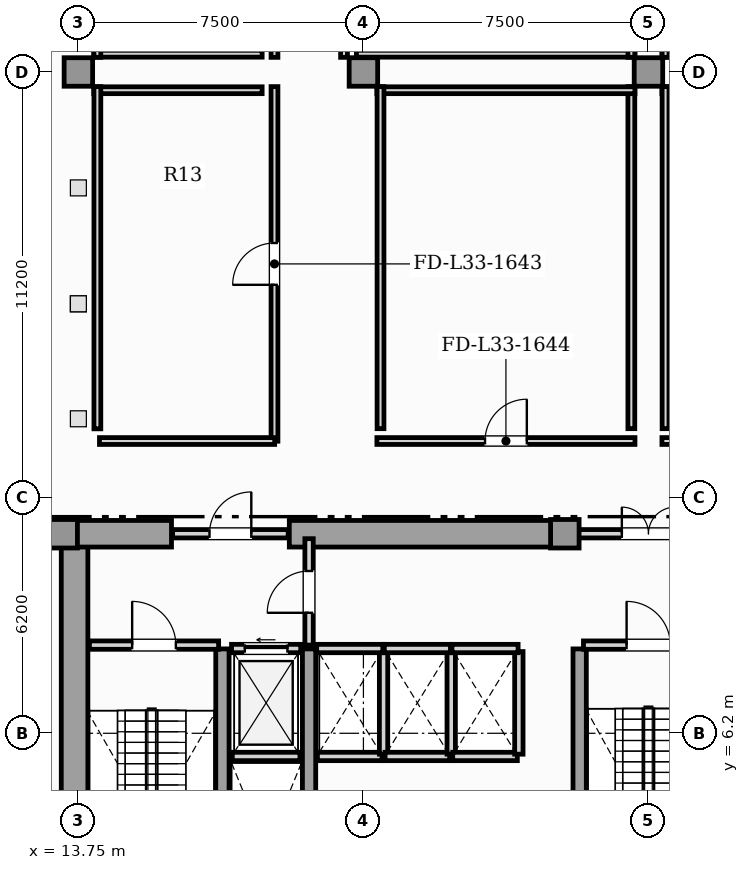
"""IFC4 building model, lengths in metres.
Left out: names, types, materials, properties, quantities, classifications, styles, units other than length and angle.
Written with IfcOpenShell. Run it as: python <this file> out.ifc"""

import sys

from ifc_helpers import new_model, si_unit, direction, frame, frame_2d, origin, origin_2d, place, context, subcontext, project, spatial, rectangle, extrude, element, fill, save


model = new_model("IFC4")
c1 = context("Model", 3, precision=1e-05, world=origin(), true_north=direction((0.0, 1.0)))
c2 = subcontext(c1, "Body", "Model", "MODEL_VIEW")
j1 = project(units=[si_unit("LENGTHUNIT", "METRE"), si_unit("PLANEANGLEUNIT", "RADIAN")], contexts=[c1])
p1 = place(None, origin())
s1 = spatial("IfcSite", under=j1, at=p1, CompositionType="ELEMENT")
p2 = place(p1, origin())
s2 = spatial("IfcBuilding", under=s1, at=p2, CompositionType="ELEMENT")
p3 = place(p2, frame((0.0, 0.0, 134.95)))
s3 = spatial("IfcBuildingStorey", under=s2, at=p3, CompositionType="ELEMENT", Elevation=134.95)
p4 = place(p3, frame((13.65, 0.92, 0.0), z_axis=(0.0, 0.0, 1.0), x_axis=(0.0, 1.0, 0.0)))
e1 = element("IfcWall", 1, at=p4, inside=s3, PredefinedType="SHEAR", context=c2, shape_type="SweptSolid", body=[
    extrude(rectangle(XDim=10.53, YDim=0.7, at=frame_2d((5.265, 0.0))), origin(), (0.0, 0.0, 1.0), 4.92),
])
p5 = place(p3, frame((13.25, 11.45, 0.0), z_axis=(0.0, 0.0, 1.0), x_axis=(1.0, 0.0, 0.0)))
e2 = element("IfcWall", 2, at=p5, inside=s3, PredefinedType="SHEAR", context=c2, shape_type="SweptSolid", body=[
    extrude(rectangle(XDim=2.95, YDim=0.7, at=frame_2d((1.475, 0.0))), origin(), (0.0, 0.0, 1.0), 4.92),
])
p6 = place(p3, frame((19.3, 11.45, 0.0), z_axis=(0.0, 0.0, 1.0), x_axis=(1.0, 0.0, 0.0)))
e3 = element("IfcWall", 3, at=p6, inside=s3, PredefinedType="SHEAR", context=c2, shape_type="SweptSolid", body=[
    extrude(rectangle(XDim=7.3, YDim=0.7, at=frame_2d((3.65, 0.0))), origin(), (0.0, 0.0, 1.0), 4.92),
])
for number, where, z_axis, x_axis in (
    (4, (17.54, 0.92, 0.0), (0.0, 0.0, 1.0), (0.0, 1.0, 0.0)),
    (5, (19.82, 0.92, 0.0), (0.0, 0.0, 1.0), (0.0, 1.0, 0.0)),
    (6, (26.94, 0.92, 0.0), (0.0, 0.0, 1.0), (0.0, 1.0, 0.0)),
):
    element("IfcWall", number, at=place(p3, frame(where, z_axis=z_axis, x_axis=x_axis)), inside=s3, PredefinedType="SHEAR", context=c2, shape_type="SweptSolid", body=[
        extrude(rectangle(XDim=7.5, YDim=0.35, at=frame_2d((3.75, 0.0))), origin(), (0.0, 0.0, 1.0), 4.92),
    ])
for number, where, z_axis, x_axis in (
    (7, (13.35, 11.45, 0.0), (0.0, 0.0, 1.0), (1.0, 0.0, 0.0)),
    (8, (26.55, 11.45, 0.0), (0.0, 0.0, 1.0), (1.0, 0.0, 0.0)),
    (9, (13.75, 23.6, 0.0), (0.0, 0.0, 1.0), (1.0, 0.0, 0.0)),
    (10, (21.25, 23.6, 0.0), (0.0, 0.0, 1.0), (1.0, 0.0, 0.0)),
    (11, (28.75, 23.6, 0.0), (0.0, 0.0, 1.0), (1.0, 0.0, 0.0)),
):
    element("IfcColumn", number, at=place(p3, frame(where, z_axis=z_axis, x_axis=x_axis)), inside=s3, PredefinedType="COLUMN", context=c2, shape_type="SweptSolid", body=[
        extrude(rectangle(XDim=0.75, YDim=0.75, at=origin_2d()), origin(), (0.0, 0.0, 1.0), 5.2),
    ])
p7 = place(p3, frame((17.8, 5.59, 0.0), z_axis=(0.0, 0.0, 1.0), x_axis=(1.0, 0.0, 0.0)))
e12 = element("IfcWall", 12, at=p7, inside=s3, PredefinedType="SOLIDWALL", context=c2, shape_type="SweptSolid", body=[
    extrude(rectangle(XDim=1.78, YDim=0.22, at=frame_2d((0.89, 0.0))), origin(), (0.0, 0.0, 1.0), 4.92),
])
p8 = place(p3, frame((17.78, 8.43, 0.0), z_axis=(0.0, 0.0, 1.0), x_axis=(1.0, 0.0, 0.0)))
e13 = element("IfcWall", 13, at=p8, inside=s3, PredefinedType="SOLIDWALL", context=c2, shape_type="SweptSolid", body=[
    extrude(rectangle(XDim=1.82, YDim=0.22, at=frame_2d((0.91, 0.0))), origin(), (0.0, 0.0, 1.0), 4.92),
])
p9 = place(p8, frame((0.35, 0.0, 0.0)))
e14 = element("IfcOpeningElement", 14, at=p9, cuts=e13, PredefinedType="OPENING", context=c2, shape_type="SweptSolid", body=[
    extrude(rectangle(XDim=1.12, YDim=2.25, at=frame_2d((0.56, 1.125))), frame((0.0, 0.12, 0.0), z_axis=(0.0, -1.0, 0.0), x_axis=(1.0, 0.0, 0.0)), (0.0, 0.0, 1.0), 0.24),
])
p10 = place(p3, frame((20.04, 5.59, 0.0), z_axis=(0.0, 0.0, 1.0), x_axis=(1.0, 0.0, 0.0)))
e15 = element("IfcWall", 15, at=p10, inside=s3, PredefinedType="SOLIDWALL", context=c2, shape_type="SweptSolid", body=[
    extrude(rectangle(XDim=1.7, YDim=0.22, at=frame_2d((0.85, 0.0))), origin(), (0.0, 0.0, 1.0), 4.92),
])
p11 = place(p3, frame((21.78, 5.65, 0.0), z_axis=(0.0, 0.0, 1.0), x_axis=(0.0, 1.0, 0.0)))
e16 = element("IfcWall", 16, at=p11, inside=s3, PredefinedType="SOLIDWALL", context=c2, shape_type="SweptSolid", body=[
    extrude(rectangle(XDim=2.7, YDim=0.22, at=frame_2d((1.35, 0.0))), origin(), (0.0, 0.0, 1.0), 4.92),
])
p12 = place(p3, frame((20.02, 8.43, 0.0), z_axis=(0.0, 0.0, 1.0), x_axis=(1.0, 0.0, 0.0)))
e17 = element("IfcWall", 17, at=p12, inside=s3, PredefinedType="SOLIDWALL", context=c2, shape_type="SweptSolid", body=[
    extrude(rectangle(XDim=1.74, YDim=0.22, at=frame_2d((0.87, 0.0))), origin(), (0.0, 0.0, 1.0), 4.92),
])
p13 = place(p3, frame((21.82, 5.59, 0.0), z_axis=(0.0, 0.0, 1.0), x_axis=(1.0, 0.0, 0.0)))
e18 = element("IfcWall", 18, at=p13, inside=s3, PredefinedType="SOLIDWALL", context=c2, shape_type="SweptSolid", body=[
    extrude(rectangle(XDim=1.7, YDim=0.22, at=frame_2d((0.85, 0.0))), origin(), (0.0, 0.0, 1.0), 4.92),
])
p14 = place(p3, frame((23.56, 5.65, 0.0), z_axis=(0.0, 0.0, 1.0), x_axis=(0.0, 1.0, 0.0)))
e19 = element("IfcWall", 19, at=p14, inside=s3, PredefinedType="SOLIDWALL", context=c2, shape_type="SweptSolid", body=[
    extrude(rectangle(XDim=2.7, YDim=0.22, at=frame_2d((1.35, 0.0))), origin(), (0.0, 0.0, 1.0), 4.92),
])
p15 = place(p3, frame((21.8, 8.43, 0.0), z_axis=(0.0, 0.0, 1.0), x_axis=(1.0, 0.0, 0.0)))
e20 = element("IfcWall", 20, at=p15, inside=s3, PredefinedType="SOLIDWALL", context=c2, shape_type="SweptSolid", body=[
    extrude(rectangle(XDim=1.74, YDim=0.22, at=frame_2d((0.87, 0.0))), origin(), (0.0, 0.0, 1.0), 4.92),
])
p16 = place(p3, frame((23.6, 5.59, 0.0), z_axis=(0.0, 0.0, 1.0), x_axis=(1.0, 0.0, 0.0)))
e21 = element("IfcWall", 21, at=p16, inside=s3, PredefinedType="SOLIDWALL", context=c2, shape_type="SweptSolid", body=[
    extrude(rectangle(XDim=1.7, YDim=0.22, at=frame_2d((0.85, 0.0))), origin(), (0.0, 0.0, 1.0), 4.92),
])
p17 = place(p3, frame((25.34, 5.65, 0.0), z_axis=(0.0, 0.0, 1.0), x_axis=(0.0, 1.0, 0.0)))
e22 = element("IfcWall", 22, at=p17, inside=s3, PredefinedType="SOLIDWALL", context=c2, shape_type="SweptSolid", body=[
    extrude(rectangle(XDim=2.7, YDim=0.22, at=frame_2d((1.35, 0.0))), origin(), (0.0, 0.0, 1.0), 4.92),
])
p18 = place(p3, frame((23.58, 8.43, 0.0), z_axis=(0.0, 0.0, 1.0), x_axis=(1.0, 0.0, 0.0)))
e23 = element("IfcWall", 23, at=p18, inside=s3, PredefinedType="SOLIDWALL", context=c2, shape_type="SweptSolid", body=[
    extrude(rectangle(XDim=1.74, YDim=0.22, at=frame_2d((0.87, 0.0))), origin(), (0.0, 0.0, 1.0), 4.92),
])
p19 = place(p3, frame((14.04, 8.52, 0.0), z_axis=(0.0, 0.0, 1.0), x_axis=(1.0, 0.0, 0.0)))
e24 = element("IfcWall", 24, at=p19, inside=s3, PredefinedType="SOLIDWALL", context=c2, shape_type="SweptSolid", body=[
    extrude(rectangle(XDim=3.4, YDim=0.22, at=frame_2d((1.7, 0.0))), origin(), (0.0, 0.0, 1.0), 4.92),
])
p20 = place(p19, frame((1.125, 0.0, 0.0)))
e25 = element("IfcOpeningElement", 25, at=p20, cuts=e24, PredefinedType="OPENING", context=c2, shape_type="SweptSolid", body=[
    extrude(rectangle(XDim=1.15, YDim=2.2, at=frame_2d((0.575, 1.1))), frame((0.0, 0.12, 0.0), z_axis=(0.0, -1.0, 0.0), x_axis=(1.0, 0.0, 0.0)), (0.0, 0.0, 1.0), 0.24),
])
p21 = place(p3, frame((27.04, 8.52, 0.0), z_axis=(0.0, 0.0, 1.0), x_axis=(1.0, 0.0, 0.0)))
e26 = element("IfcWall", 26, at=p21, inside=s3, PredefinedType="SOLIDWALL", context=c2, shape_type="SweptSolid", body=[
    extrude(rectangle(XDim=3.42, YDim=0.22, at=frame_2d((1.71, 0.0))), origin(), (0.0, 0.0, 1.0), 4.92),
])
p22 = place(p21, frame((1.135, 0.0, 0.0)))
e27 = element("IfcOpeningElement", 27, at=p22, cuts=e26, PredefinedType="OPENING", context=c2, shape_type="SweptSolid", body=[
    extrude(rectangle(XDim=1.15, YDim=2.2, at=frame_2d((0.575, 1.1))), frame((0.0, 0.12, 0.0), z_axis=(0.0, -1.0, 0.0), x_axis=(1.0, 0.0, 0.0)), (0.0, 0.0, 1.0), 0.24),
])
p23 = place(p3, frame((19.82, 8.52, 0.0), z_axis=(0.0, 0.0, 1.0), x_axis=(0.0, 1.0, 0.0)))
e28 = element("IfcWall", 28, at=p23, inside=s3, PredefinedType="SOLIDWALL", context=c2, shape_type="SweptSolid", body=[
    extrude(rectangle(XDim=2.8, YDim=0.22, at=frame_2d((1.4, 0.0))), origin(), (0.0, 0.0, 1.0), 4.375),
])
p24 = place(p23, frame((0.85, 0.0, 0.0)))
e29 = element("IfcOpeningElement", 29, at=p24, cuts=e28, PredefinedType="OPENING", context=c2, shape_type="SweptSolid", body=[
    extrude(rectangle(XDim=1.1, YDim=2.2, at=frame_2d((0.55, 1.1))), frame((0.0, 0.12, 0.0), z_axis=(0.0, -1.0, 0.0), x_axis=(1.0, 0.0, 0.0)), (0.0, 0.0, 1.0), 0.24),
])
p25 = place(p3, frame((16.23, 11.45, 0.0), z_axis=(0.0, 0.0, 1.0), x_axis=(1.0, 0.0, 0.0)))
e30 = element("IfcWall", 30, at=p25, inside=s3, PredefinedType="SOLIDWALL", context=c2, shape_type="SweptSolid", body=[
    extrude(rectangle(XDim=3.04, YDim=0.22, at=frame_2d((1.52, 0.0))), origin(), (0.0, 0.0, 1.0), 4.92),
])
p26 = place(p25, frame((0.97, 0.0, 0.0)))
e31 = element("IfcOpeningElement", 31, at=p26, cuts=e30, PredefinedType="OPENING", context=c2, shape_type="SweptSolid", body=[
    extrude(rectangle(XDim=1.1, YDim=2.2, at=frame_2d((0.55, 1.1))), frame((0.0, 0.12, 0.0), z_axis=(0.0, -1.0, 0.0), x_axis=(1.0, 0.0, 0.0)), (0.0, 0.0, 1.0), 0.24),
])
p27 = place(p3, frame((26.63, 11.45, 0.0), z_axis=(0.0, 0.0, 1.0), x_axis=(1.0, 0.0, 0.0)))
e32 = element("IfcWall", 32, at=p27, inside=s3, PredefinedType="SOLIDWALL", context=c2, shape_type="SweptSolid", body=[
    extrude(rectangle(XDim=4.24, YDim=0.22, at=frame_2d((2.12, 0.0))), origin(), (0.0, 0.0, 1.0), 4.92),
])
p28 = place(p27, frame((1.42, 0.0, 0.0)))
e33 = element("IfcOpeningElement", 33, at=p28, cuts=e32, PredefinedType="OPENING", context=c2, shape_type="SweptSolid", body=[
    extrude(rectangle(XDim=1.4, YDim=2.2, at=frame_2d((0.7, 1.1))), frame((0.0, 0.12, 0.0), z_axis=(0.0, -1.0, 0.0), x_axis=(1.0, 0.0, 0.0)), (0.0, 0.0, 1.0), 0.24),
])
p29 = place(p3, frame((18.91, 13.885, 0.0), z_axis=(0.0, 0.0, 1.0), x_axis=(0.0, 1.0, 0.0)))
e34 = element("IfcWall", 34, at=p29, inside=s3, PredefinedType="PARTITIONING", context=c2, shape_type="SweptSolid", body=[
    extrude(rectangle(XDim=9.33, YDim=0.18, at=frame_2d((4.665, 0.0))), origin(), (0.0, 0.0, 1.0), 4.92),
])
p30 = place(p29, frame((4.115, 0.0, 0.0)))
e35 = element("IfcOpeningElement", 35, at=p30, cuts=e34, PredefinedType="OPENING", context=c2, shape_type="SweptSolid", body=[
    extrude(rectangle(XDim=1.1, YDim=2.2, at=frame_2d((0.55, 1.1))), frame((0.0, 0.1, 0.0), z_axis=(0.0, -1.0, 0.0), x_axis=(1.0, 0.0, 0.0)), (0.0, 0.0, 1.0), 0.2),
])
p31 = place(p3, frame((14.305, 13.89, 0.0), z_axis=(0.0, 0.0, 1.0), x_axis=(1.0, 0.0, 0.0)))
e36 = element("IfcWall", 36, at=p31, inside=s3, PredefinedType="PARTITIONING", context=c2, shape_type="SweptSolid", body=[
    extrude(rectangle(XDim=4.61, YDim=0.18, at=frame_2d((2.305, 0.0))), origin(), (0.0, 0.0, 1.0), 4.92),
])
p32 = place(p3, frame((21.605, 13.89, 0.0), z_axis=(0.0, 0.0, 1.0), x_axis=(1.0, 0.0, 0.0)))
e37 = element("IfcWall", 37, at=p32, inside=s3, PredefinedType="PARTITIONING", context=c2, shape_type="SweptSolid", body=[
    extrude(rectangle(XDim=6.79, YDim=0.18, at=frame_2d((3.395, 0.0))), origin(), (0.0, 0.0, 1.0), 4.92),
])
p33 = place(p32, frame((2.845, 0.0, 0.0)))
e38 = element("IfcOpeningElement", 38, at=p33, cuts=e37, PredefinedType="OPENING", context=c2, shape_type="SweptSolid", body=[
    extrude(rectangle(XDim=1.1, YDim=2.2, at=frame_2d((0.55, 1.1))), frame((0.0, 0.1, 0.0), z_axis=(0.0, -1.0, 0.0), x_axis=(1.0, 0.0, 0.0)), (0.0, 0.0, 1.0), 0.2),
])
p34 = place(p3, frame((29.105, 13.89, 0.0), z_axis=(0.0, 0.0, 1.0), x_axis=(1.0, 0.0, 0.0)))
e39 = element("IfcWall", 39, at=p34, inside=s3, PredefinedType="PARTITIONING", context=c2, shape_type="SweptSolid", body=[
    extrude(rectangle(XDim=7.66, YDim=0.18, at=frame_2d((3.83, 0.0))), origin(), (0.0, 0.0, 1.0), 4.92),
])
p35 = place(p3, frame((20.74, 23.985, 0.0), z_axis=(0.0, 0.0, 1.0), x_axis=(0.0, 1.0, 0.0)))
e40 = element("IfcWall", 40, at=p35, inside=s3, PredefinedType="PARTITIONING", context=c2, shape_type="SweptSolid", body=[
    extrude(rectangle(XDim=4.13, YDim=0.18, at=frame_2d((2.065, 0.0))), origin(), (0.0, 0.0, 1.0), 4.92),
])
p36 = place(p35, frame((1.515, 0.0, 0.0)))
e41 = element("IfcOpeningElement", 41, at=p36, cuts=e40, PredefinedType="OPENING", context=c2, shape_type="SweptSolid", body=[
    extrude(rectangle(XDim=1.1, YDim=2.2, at=frame_2d((0.55, 1.1))), frame((0.0, 0.1, 0.0), z_axis=(0.0, -1.0, 0.0), x_axis=(1.0, 0.0, 0.0)), (0.0, 0.0, 1.0), 0.2),
])
p37 = place(p3, frame((18.91, 23.985, 0.0), z_axis=(0.0, 0.0, 1.0), x_axis=(0.0, 1.0, 0.0)))
e42 = element("IfcWall", 42, at=p37, inside=s3, PredefinedType="PARTITIONING", context=c2, shape_type="SweptSolid", body=[
    extrude(rectangle(XDim=2.13, YDim=0.18, at=frame_2d((1.065, 0.0))), origin(), (0.0, 0.0, 1.0), 4.92),
])
p38 = place(p37, frame((0.515, 0.0, 0.0)))
e43 = element("IfcOpeningElement", 43, at=p38, cuts=e42, PredefinedType="OPENING", context=c2, shape_type="SweptSolid", body=[
    extrude(rectangle(XDim=1.1, YDim=2.2, at=frame_2d((0.55, 1.1))), frame((0.0, 0.1, 0.0), z_axis=(0.0, -1.0, 0.0), x_axis=(1.0, 0.0, 0.0)), (0.0, 0.0, 1.0), 0.2),
])
p39 = place(p3, frame((18.585, 23.12, 0.0), z_axis=(0.0, 0.0, 1.0), x_axis=(-1.0, 0.0, 0.0)))
e44 = element("IfcWall", 44, at=p39, inside=s3, PredefinedType="PARTITIONING", context=c2, shape_type="SweptSolid", body=[
    extrude(rectangle(XDim=4.43, YDim=0.18, at=frame_2d((2.215, 0.0))), origin(), (0.0, 0.0, 1.0), 4.92),
])
p40 = place(p3, frame((14.25, 23.215, 0.0), z_axis=(0.0, 0.0, 1.0), x_axis=(0.0, -1.0, 0.0)))
e45 = element("IfcWall", 45, at=p40, inside=s3, PredefinedType="PARTITIONING", context=c2, shape_type="SweptSolid", body=[
    extrude(rectangle(XDim=9.004, YDim=0.18, at=frame_2d((4.502, 0.0))), origin(), (0.0, 0.0, 1.0), 4.92),
])
p41 = place(p3, frame((28.3, 14.215, 0.0), z_axis=(0.0, 0.0, 1.0), x_axis=(0.0, 1.0, 0.0)))
e46 = element("IfcWall", 46, at=p41, inside=s3, PredefinedType="PARTITIONING", context=c2, shape_type="SweptSolid", body=[
    extrude(rectangle(XDim=9.0, YDim=0.18, at=frame_2d((4.5, 0.0))), origin(), (0.0, 0.0, 1.0), 4.92),
])
p42 = place(p3, frame((28.395, 23.12, 0.0), z_axis=(0.0, 0.0, 1.0), x_axis=(-1.0, 0.0, 0.0)))
e47 = element("IfcWall", 47, at=p42, inside=s3, PredefinedType="PARTITIONING", context=c2, shape_type="SweptSolid", body=[
    extrude(rectangle(XDim=6.79, YDim=0.18, at=frame_2d((3.395, 0.0))), origin(), (0.0, 0.0, 1.0), 4.92),
])
p43 = place(p3, frame((21.7, 23.215, 0.0), z_axis=(0.0, 0.0, 1.0), x_axis=(0.0, -1.0, 0.0)))
e48 = element("IfcWall", 48, at=p43, inside=s3, PredefinedType="PARTITIONING", context=c2, shape_type="SweptSolid", body=[
    extrude(rectangle(XDim=9.0, YDim=0.18, at=frame_2d((4.5, 0.0))), origin(), (0.0, 0.0, 1.0), 4.92),
])
p44 = place(p3, frame((36.435, 23.12, 0.0), z_axis=(0.0, 0.0, 1.0), x_axis=(-1.0, 0.0, 0.0)))
e49 = element("IfcWall", 49, at=p44, inside=s3, PredefinedType="PARTITIONING", context=c2, shape_type="SweptSolid", body=[
    extrude(rectangle(XDim=7.33, YDim=0.18, at=frame_2d((3.665, 0.0))), origin(), (0.0, 0.0, 1.0), 4.92),
])
p45 = place(p3, frame((29.2, 23.215, 0.0), z_axis=(0.0, 0.0, 1.0), x_axis=(0.0, -1.0, 0.0)))
e50 = element("IfcWall", 50, at=p45, inside=s3, PredefinedType="PARTITIONING", context=c2, shape_type="SweptSolid", body=[
    extrude(rectangle(XDim=9.0, YDim=0.18, at=frame_2d((4.5, 0.0))), origin(), (0.0, 0.0, 1.0), 4.92),
])
p46 = place(p3, frame((21.065, 24.08, 0.0), z_axis=(0.0, 0.0, 1.0), x_axis=(1.0, 0.0, 0.0)))
e51 = element("IfcWall", 51, at=p46, inside=s3, PredefinedType="PARTITIONING", context=c2, shape_type="SweptSolid", body=[
    extrude(rectangle(XDim=7.33, YDim=0.18, at=frame_2d((3.665, 0.0))), origin(), (0.0, 0.0, 1.0), 4.92),
])
p47 = place(p3, frame((28.3, 23.985, 0.0), z_axis=(0.0, 0.0, 1.0), x_axis=(0.0, 1.0, 0.0)))
e52 = element("IfcWall", 52, at=p47, inside=s3, PredefinedType="PARTITIONING", context=c2, shape_type="SweptSolid", body=[
    extrude(rectangle(XDim=4.13, YDim=0.18, at=frame_2d((2.065, 0.0))), origin(), (0.0, 0.0, 1.0), 4.92),
])
p48 = place(p3, frame((29.105, 24.08, 0.0), z_axis=(0.0, 0.0, 1.0), x_axis=(1.0, 0.0, 0.0)))
e53 = element("IfcWall", 53, at=p48, inside=s3, PredefinedType="PARTITIONING", context=c2, shape_type="SweptSolid", body=[
    extrude(rectangle(XDim=7.33, YDim=0.18, at=frame_2d((3.665, 0.0))), origin(), (0.0, 0.0, 1.0), 4.92),
])
p49 = place(p3, frame((29.2, 28.115, 0.0), z_axis=(0.0, 0.0, 1.0), x_axis=(0.0, -1.0, 0.0)))
e54 = element("IfcWall", 54, at=p49, inside=s3, PredefinedType="PARTITIONING", context=c2, shape_type="SweptSolid", body=[
    extrude(rectangle(XDim=4.13, YDim=0.18, at=frame_2d((2.065, 0.0))), origin(), (0.0, 0.0, 1.0), 4.92),
])
p50 = place(p3, frame((14.155, 24.08, 0.0), z_axis=(0.0, 0.0, 1.0), x_axis=(1.0, 0.0, 0.0)))
e55 = element("IfcWall", 55, at=p50, inside=s3, PredefinedType="PARTITIONING", context=c2, shape_type="SweptSolid", body=[
    extrude(rectangle(XDim=4.43, YDim=0.18, at=frame_2d((2.215, 0.0))), origin(), (0.0, 0.0, 1.0), 4.92),
])
p51 = place(p3, frame((14.25, 25.789, 0.0), z_axis=(0.0, 0.0, 1.0), x_axis=(0.0, -1.0, 0.0)))
e56 = element("IfcWall", 56, at=p51, inside=s3, PredefinedType="PARTITIONING", context=c2, shape_type="SweptSolid", body=[
    extrude(rectangle(XDim=1.804, YDim=0.18, at=frame_2d((0.902, 0.0))), origin(), (0.0, 0.0, 1.0), 4.92),
])
p52 = place(p9, origin())
e57 = element("IfcDoor", 57, at=p52, inside=s3, OperationType="SLIDING_TO_LEFT", PredefinedType="DOOR", context=c2, shape_type="SweptSolid", body=[
    extrude(rectangle(XDim=1.12, YDim=2.25, at=frame_2d((0.56, 1.125))), frame((0.0, 0.025, 0.0), z_axis=(0.0, -1.0, 0.0), x_axis=(1.0, 0.0, 0.0)), (0.0, 0.0, 1.0), 0.05),
])
fill(e14, e57)
p53 = place(p20, origin())
e58 = element("IfcDoor", 58, at=p53, inside=s3, OperationType="SINGLE_SWING_LEFT", PredefinedType="DOOR", context=c2, shape_type="SweptSolid", body=[
    extrude(rectangle(XDim=1.15, YDim=2.2, at=frame_2d((0.575, 1.1))), frame((0.0, 0.025, 0.0), z_axis=(0.0, -1.0, 0.0), x_axis=(1.0, 0.0, 0.0)), (0.0, 0.0, 1.0), 0.05),
])
fill(e25, e58)
p54 = place(p22, origin())
e59 = element("IfcDoor", 59, at=p54, inside=s3, OperationType="SINGLE_SWING_LEFT", PredefinedType="DOOR", context=c2, shape_type="SweptSolid", body=[
    extrude(rectangle(XDim=1.15, YDim=2.2, at=frame_2d((0.575, 1.1))), frame((0.0, 0.025, 0.0), z_axis=(0.0, -1.0, 0.0), x_axis=(1.0, 0.0, 0.0)), (0.0, 0.0, 1.0), 0.05),
])
fill(e27, e59)
p55 = place(p24, origin())
e60 = element("IfcDoor", 60, at=p55, inside=s3, OperationType="SINGLE_SWING_LEFT", PredefinedType="DOOR", context=c2, shape_type="SweptSolid", body=[
    extrude(rectangle(XDim=1.1, YDim=2.2, at=frame_2d((0.55, 1.1))), frame((0.0, 0.025, 0.0), z_axis=(0.0, -1.0, 0.0), x_axis=(1.0, 0.0, 0.0)), (0.0, 0.0, 1.0), 0.05),
])
fill(e29, e60)
p56 = place(p26, origin())
e61 = element("IfcDoor", 61, at=p56, inside=s3, OperationType="SINGLE_SWING_RIGHT", PredefinedType="DOOR", context=c2, shape_type="SweptSolid", body=[
    extrude(rectangle(XDim=1.1, YDim=2.2, at=frame_2d((0.55, 1.1))), frame((0.0, 0.025, 0.0), z_axis=(0.0, -1.0, 0.0), x_axis=(1.0, 0.0, 0.0)), (0.0, 0.0, 1.0), 0.05),
])
fill(e31, e61)
p57 = place(p28, origin())
e62 = element("IfcDoor", 62, at=p57, inside=s3, OperationType="DOUBLE_DOOR_SINGLE_SWING", PredefinedType="DOOR", context=c2, shape_type="SweptSolid", body=[
    extrude(rectangle(XDim=1.4, YDim=2.2, at=frame_2d((0.7, 1.1))), frame((0.0, 0.025, 0.0), z_axis=(0.0, -1.0, 0.0), x_axis=(1.0, 0.0, 0.0)), (0.0, 0.0, 1.0), 0.05),
])
fill(e33, e62)
p58 = place(p30, origin())
e63 = element("IfcDoor", 63, at=p58, inside=s3, OperationType="SINGLE_SWING_LEFT", PredefinedType="DOOR", context=c2, shape_type="SweptSolid", body=[
    extrude(rectangle(XDim=1.1, YDim=2.2, at=frame_2d((0.55, 1.1))), frame((0.0, 0.025, 0.0), z_axis=(0.0, -1.0, 0.0), x_axis=(1.0, 0.0, 0.0)), (0.0, 0.0, 1.0), 0.05),
])
fill(e35, e63)
p59 = place(p33, origin())
e64 = element("IfcDoor", 64, at=p59, inside=s3, OperationType="SINGLE_SWING_RIGHT", PredefinedType="DOOR", context=c2, shape_type="SweptSolid", body=[
    extrude(rectangle(XDim=1.1, YDim=2.2, at=frame_2d((0.55, 1.1))), frame((0.0, 0.025, 0.0), z_axis=(0.0, -1.0, 0.0), x_axis=(1.0, 0.0, 0.0)), (0.0, 0.0, 1.0), 0.05),
])
fill(e38, e64)
save(model, sys.argv[1])
